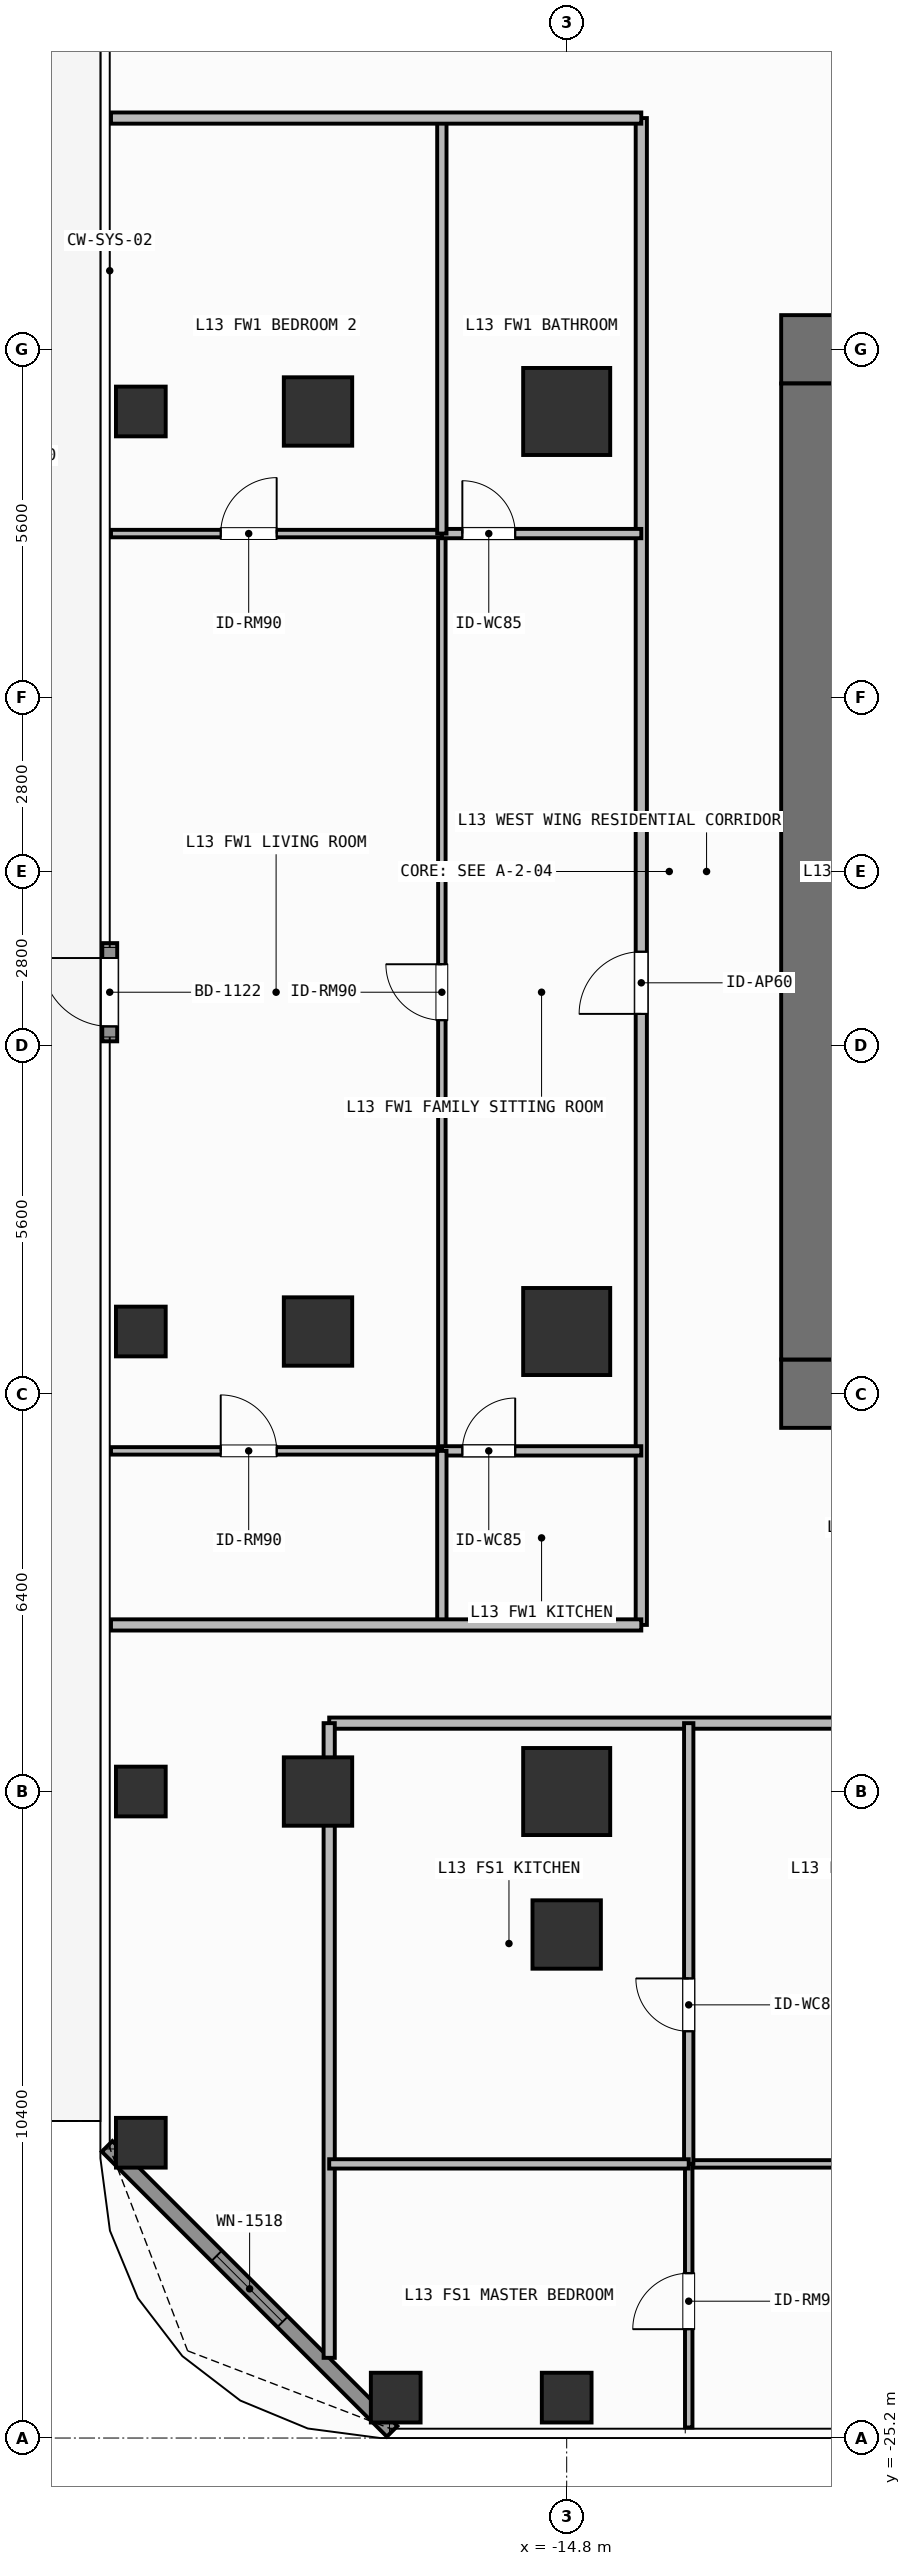
"""IFC4 building model, lengths in metres.
Left out: names, types, materials, properties, quantities, classifications, styles, units other than length and angle.
Written with IfcOpenShell. Run it as: python <this file> out.ifc"""

import sys

from ifc_helpers import new_model, si_unit, direction, frame, frame_2d, origin, origin_2d, place, context, subcontext, project, spatial, rectangle, hollow_rectangle, extrude, element, fill, save


model = new_model("IFC4")
c1 = context("Model", 3, precision=1e-05, world=origin(), true_north=direction((0.0, 1.0)))
c2 = subcontext(c1, "Body", "Model", "MODEL_VIEW")
j1 = project(units=[si_unit("LENGTHUNIT", "METRE"), si_unit("PLANEANGLEUNIT", "RADIAN")], contexts=[c1])
p1 = place(None, origin())
s1 = spatial("IfcSite", under=j1, at=p1, CompositionType="ELEMENT")
p2 = place(p1, origin())
s2 = spatial("IfcBuilding", under=s1, at=p2, CompositionType="ELEMENT")
p3 = place(p2, frame((0.0, 0.0, 50.1)))
s3 = spatial("IfcBuildingStorey", under=s2, at=p3, CompositionType="ELEMENT", Elevation=50.1)
for number, where, z_axis, x_axis in (
    (1, (-11.35, -8.4, 0.0), (0.0, 0.0, 1.0), (1.0, 0.0, 0.0)),
    (2, (-11.35, 8.4, 0.0), (0.0, 0.0, 1.0), (1.0, 0.0, 0.0)),
):
    element("IfcWall", number, at=place(p3, frame(where, z_axis=z_axis, x_axis=x_axis)), inside=s3, PredefinedType="SHEAR", context=c2, shape_type="SweptSolid", body=[
        extrude(rectangle(XDim=1.65, YDim=1.1, at=frame_2d((0.825, 0.0))), origin(), (0.0, 0.0, 1.0), 3.9),
    ])
p4 = place(p3, frame((-10.8, -7.85, 0.0), z_axis=(0.0, 0.0, 1.0), x_axis=(0.0, 1.0, 0.0)))
e3 = element("IfcWall", 3, at=p4, inside=s3, PredefinedType="SHEAR", context=c2, shape_type="SweptSolid", body=[
    extrude(rectangle(XDim=15.7, YDim=1.1, at=frame_2d((7.85, 0.0))), origin(), (0.0, 0.0, 1.0), 3.9),
])
for number, where, z_axis, x_axis in (
    (4, (-14.8, -14.8, 0.0), (0.0, 0.0, 1.0), (1.0, 0.0, 0.0)),
    (5, (-14.8, -7.4, 0.0), (0.0, 0.0, 1.0), (1.0, 0.0, 0.0)),
    (6, (-14.8, 7.4, 0.0), (0.0, 0.0, 1.0), (1.0, 0.0, 0.0)),
):
    element("IfcColumn", number, at=place(p3, frame(where, z_axis=z_axis, x_axis=x_axis)), inside=s3, PredefinedType="COLUMN", context=c2, shape_type="SweptSolid", body=[
        extrude(rectangle(XDim=1.4, YDim=1.4, at=origin_2d()), origin(), (0.0, 0.0, 1.0), 3.9),
    ])
for number, where, z_axis, x_axis in (
    (7, (-18.8, -14.8, 0.0), (0.0, 0.0, 1.0), (1.0, 0.0, 0.0)),
    (8, (-18.8, -7.4, 0.0), (0.0, 0.0, 1.0), (1.0, 0.0, 0.0)),
    (9, (-18.8, 7.4, 0.0), (0.0, 0.0, 1.0), (1.0, 0.0, 0.0)),
    (10, (-14.8, -17.1, 0.0), (0.0, 0.0, 1.0), (1.0, 0.0, 0.0)),
):
    element("IfcColumn", number, at=place(p3, frame(where, z_axis=z_axis, x_axis=x_axis)), inside=s3, PredefinedType="COLUMN", context=c2, shape_type="SweptSolid", body=[
        extrude(rectangle(XDim=1.1, YDim=1.1, at=origin_2d()), origin(), (0.0, 0.0, 1.0), 3.9),
    ])
for number, where, z_axis, x_axis in (
    (11, (-17.55, -24.55, 0.0), (0.0, 0.0, 1.0), (1.0, 0.0, 0.0)),
    (12, (-21.65, -20.45, 0.0), (0.0, 0.0, 1.0), (1.0, 0.0, 0.0)),
    (13, (-14.8, -24.55, 0.0), (0.0, 0.0, 1.0), (1.0, 0.0, 0.0)),
    (14, (-21.65, -14.8, 0.0), (0.0, 0.0, 1.0), (1.0, 0.0, 0.0)),
    (15, (-21.65, -7.4, 0.0), (0.0, 0.0, 1.0), (1.0, 0.0, 0.0)),
    (16, (-21.65, 7.4, 0.0), (0.0, 0.0, 1.0), (1.0, 0.0, 0.0)),
):
    element("IfcColumn", number, at=place(p3, frame(where, z_axis=z_axis, x_axis=x_axis)), inside=s3, PredefinedType="COLUMN", context=c2, shape_type="SweptSolid", body=[
        extrude(hollow_rectangle(XDim=0.8, YDim=0.8, WallThickness=0.036, at=origin_2d()), origin(), (0.0, 0.0, 1.0), 3.9),
    ])
p5 = place(p3, frame((-22.15, -2.732, 0.0), z_axis=(0.0, 0.0, 1.0), x_axis=(0.0, 1.0, 0.0)))
e17 = element("IfcWall", 17, at=p5, inside=s3, PredefinedType="SOLIDWALL", context=c2, shape_type="SweptSolid", body=[
    extrude(rectangle(XDim=1.58, YDim=0.24, at=frame_2d((0.79, 0.0))), origin(), (0.0, 0.0, 1.0), 3.62),
])
p6 = place(p5, frame((0.24, 0.0, 0.0)))
e18 = element("IfcOpeningElement", 18, at=p6, cuts=e17, PredefinedType="OPENING", context=c2, shape_type="SweptSolid", body=[
    extrude(rectangle(XDim=1.1, YDim=2.2, at=frame_2d((0.55, 1.1))), frame((0.0, 0.13, 0.0), z_axis=(0.0, -1.0, 0.0), x_axis=(1.0, 0.0, 0.0)), (0.0, 0.0, 1.0), 0.26),
])
p7 = place(p3, frame((-17.608, -25.092, 0.0), z_axis=(0.0, 0.0, 1.0), x_axis=(-0.707106781187, 0.707106781187, 0.0)))
e19 = element("IfcWall", 19, at=p7, inside=s3, PredefinedType="SOLIDWALL", context=c2, shape_type="SweptSolid", body=[
    extrude(rectangle(XDim=6.484, YDim=0.24, at=frame_2d((3.242, 0.0))), origin(), (0.0, 0.0, 1.0), 3.62),
])
p8 = place(p7, frame((2.492, 0.0, 0.8)))
e20 = element("IfcOpeningElement", 20, at=p8, cuts=e19, PredefinedType="OPENING", context=c2, shape_type="SweptSolid", body=[
    extrude(rectangle(XDim=1.5, YDim=1.85, at=frame_2d((0.75, 0.925))), frame((0.0, 0.13, 0.0), z_axis=(0.0, -1.0, 0.0), x_axis=(1.0, 0.0, 0.0)), (0.0, 0.0, 1.0), 0.26),
])
p9 = place(p3, frame((-18.62, -13.7, 0.0), z_axis=(0.0, 0.0, 1.0), x_axis=(1.0, 0.0, 0.0)))
e21 = element("IfcWall", 21, at=p9, inside=s3, PredefinedType="PARTITIONING", context=c2, shape_type="SweptSolid", body=[
    extrude(rectangle(XDim=24.963, YDim=0.18, at=frame_2d((12.481, 0.0))), origin(), (0.0, 0.0, 1.0), 3.62),
])
p10 = place(p9, frame((11.981, 0.0, 0.0)))
e22 = element("IfcOpeningElement", 22, at=p10, cuts=e21, PredefinedType="OPENING", context=c2, shape_type="SweptSolid", body=[
    extrude(rectangle(XDim=1.0, YDim=2.2, at=frame_2d((0.5, 1.1))), frame((0.0, 0.1, 0.0), z_axis=(0.0, -1.0, 0.0), x_axis=(1.0, 0.0, 0.0)), (0.0, 0.0, 1.0), 0.2),
])
p11 = place(p3, frame((-12.837, -20.79, 0.0), z_axis=(0.0, 0.0, 1.0), x_axis=(1.0, 0.0, 0.0)))
e23 = element("IfcWall", 23, at=p11, inside=s3, PredefinedType="PARTITIONING", context=c2, shape_type="SweptSolid", body=[
    extrude(rectangle(XDim=7.412, YDim=0.12, at=frame_2d((3.706, 0.0))), origin(), (0.0, 0.0, 1.0), 3.62),
])
p12 = place(p11, frame((3.344, 0.0, 0.0)))
e24 = element("IfcOpeningElement", 24, at=p12, cuts=e23, PredefinedType="OPENING", context=c2, shape_type="SweptSolid", body=[
    extrude(rectangle(XDim=0.9, YDim=2.1, at=frame_2d((0.45, 1.05))), frame((0.0, 0.07, 0.0), z_axis=(0.0, -1.0, 0.0), x_axis=(1.0, 0.0, 0.0)), (0.0, 0.0, 1.0), 0.14),
])
p13 = place(p3, frame((-12.837, -20.79, 0.0), z_axis=(0.0, 0.0, 1.0), x_axis=(0.0, 1.0, 0.0)))
e25 = element("IfcWall", 25, at=p13, inside=s3, PredefinedType="PARTITIONING", context=c2, shape_type="SweptSolid", body=[
    extrude(rectangle(XDim=7.09, YDim=0.15, at=frame_2d((3.545, 0.0))), origin(), (0.0, 0.0, 1.0), 3.62),
])
p14 = place(p13, frame((2.133, 0.0, 0.0)))
e26 = element("IfcOpeningElement", 26, at=p14, cuts=e25, PredefinedType="OPENING", context=c2, shape_type="SweptSolid", body=[
    extrude(rectangle(XDim=0.85, YDim=2.1, at=frame_2d((0.425, 1.05))), frame((0.0, 0.085, 0.0), z_axis=(0.0, -1.0, 0.0), x_axis=(1.0, 0.0, 0.0)), (0.0, 0.0, 1.0), 0.17),
])
p15 = place(p3, frame((-12.837, -25.03, 0.0), z_axis=(0.0, 0.0, 1.0), x_axis=(0.0, 1.0, 0.0)))
e27 = element("IfcWall", 27, at=p15, inside=s3, PredefinedType="PARTITIONING", context=c2, shape_type="SweptSolid", body=[
    extrude(rectangle(XDim=4.24, YDim=0.12, at=frame_2d((2.12, 0.0))), origin(), (0.0, 0.0, 1.0), 3.62),
])
p16 = place(p15, frame((1.581, 0.0, 0.0)))
e28 = element("IfcOpeningElement", 28, at=p16, cuts=e27, PredefinedType="OPENING", context=c2, shape_type="SweptSolid", body=[
    extrude(rectangle(XDim=0.9, YDim=2.1, at=frame_2d((0.45, 1.05))), frame((0.0, 0.07, 0.0), z_axis=(0.0, -1.0, 0.0), x_axis=(1.0, 0.0, 0.0)), (0.0, 0.0, 1.0), 0.14),
])
p17 = place(p3, frame((-13.6, -12.12, 0.0), z_axis=(0.0, 0.0, 1.0), x_axis=(0.0, 1.0, 0.0)))
e29 = element("IfcWall", 29, at=p17, inside=s3, PredefinedType="PARTITIONING", context=c2, shape_type="SweptSolid", body=[
    extrude(rectangle(XDim=24.24, YDim=0.18, at=frame_2d((12.12, 0.0))), origin(), (0.0, 0.0, 1.0), 3.62),
])
p18 = place(p17, frame((9.829, 0.0, 0.0)))
e30 = element("IfcOpeningElement", 30, at=p18, cuts=e29, PredefinedType="OPENING", context=c2, shape_type="SweptSolid", body=[
    extrude(rectangle(XDim=1.0, YDim=2.2, at=frame_2d((0.5, 1.1))), frame((0.0, 0.1, 0.0), z_axis=(0.0, -1.0, 0.0), x_axis=(1.0, 0.0, 0.0)), (0.0, 0.0, 1.0), 0.2),
])
p19 = place(p3, frame((-16.808, -9.32, 0.0), z_axis=(0.0, 0.0, 1.0), x_axis=(0.0, 1.0, 0.0)))
e31 = element("IfcWall", 31, at=p19, inside=s3, PredefinedType="PARTITIONING", context=c2, shape_type="SweptSolid", body=[
    extrude(rectangle(XDim=14.756, YDim=0.12, at=frame_2d((7.378, 0.0))), origin(), (0.0, 0.0, 1.0), 3.62),
])
p20 = place(p19, frame((6.928, 0.0, 0.0)))
e32 = element("IfcOpeningElement", 32, at=p20, cuts=e31, PredefinedType="OPENING", context=c2, shape_type="SweptSolid", body=[
    extrude(rectangle(XDim=0.9, YDim=2.1, at=frame_2d((0.45, 1.05))), frame((0.0, 0.07, 0.0), z_axis=(0.0, -1.0, 0.0), x_axis=(1.0, 0.0, 0.0)), (0.0, 0.0, 1.0), 0.14),
])
p21 = place(p3, frame((-16.808, 5.436, 0.0), z_axis=(0.0, 0.0, 1.0), x_axis=(1.0, 0.0, 0.0)))
e33 = element("IfcWall", 33, at=p21, inside=s3, PredefinedType="PARTITIONING", context=c2, shape_type="SweptSolid", body=[
    extrude(rectangle(XDim=3.208, YDim=0.15, at=frame_2d((1.604, 0.0))), origin(), (0.0, 0.0, 1.0), 3.62),
])
p22 = place(p21, frame((0.33, 0.0, 0.0)))
e34 = element("IfcOpeningElement", 34, at=p22, cuts=e33, PredefinedType="OPENING", context=c2, shape_type="SweptSolid", body=[
    extrude(rectangle(XDim=0.85, YDim=2.1, at=frame_2d((0.425, 1.05))), frame((0.0, 0.085, 0.0), z_axis=(0.0, -1.0, 0.0), x_axis=(1.0, 0.0, 0.0)), (0.0, 0.0, 1.0), 0.17),
])
p23 = place(p3, frame((-16.808, -9.32, 0.0), z_axis=(0.0, 0.0, 1.0), x_axis=(1.0, 0.0, 0.0)))
e35 = element("IfcWall", 35, at=p23, inside=s3, PredefinedType="PARTITIONING", context=c2, shape_type="SweptSolid", body=[
    extrude(rectangle(XDim=3.208, YDim=0.15, at=frame_2d((1.604, 0.0))), origin(), (0.0, 0.0, 1.0), 3.62),
])
p24 = place(p23, frame((0.33, 0.0, 0.0)))
e36 = element("IfcOpeningElement", 36, at=p24, cuts=e35, PredefinedType="OPENING", context=c2, shape_type="SweptSolid", body=[
    extrude(rectangle(XDim=0.85, YDim=2.1, at=frame_2d((0.425, 1.05))), frame((0.0, 0.085, 0.0), z_axis=(0.0, -1.0, 0.0), x_axis=(1.0, 0.0, 0.0)), (0.0, 0.0, 1.0), 0.17),
])
p25 = place(p3, frame((-22.13, -9.32, 0.0), z_axis=(0.0, 0.0, 1.0), x_axis=(1.0, 0.0, 0.0)))
e37 = element("IfcWall", 37, at=p25, inside=s3, PredefinedType="PARTITIONING", context=c2, shape_type="SweptSolid", body=[
    extrude(rectangle(XDim=5.322, YDim=0.12, at=frame_2d((2.661, 0.0))), origin(), (0.0, 0.0, 1.0), 3.62),
])
p26 = place(p25, frame((1.765, 0.0, 0.0)))
e38 = element("IfcOpeningElement", 38, at=p26, cuts=e37, PredefinedType="OPENING", context=c2, shape_type="SweptSolid", body=[
    extrude(rectangle(XDim=0.9, YDim=2.1, at=frame_2d((0.45, 1.05))), frame((0.0, 0.07, 0.0), z_axis=(0.0, -1.0, 0.0), x_axis=(1.0, 0.0, 0.0)), (0.0, 0.0, 1.0), 0.14),
])
p27 = place(p3, frame((-22.13, 5.436, 0.0), z_axis=(0.0, 0.0, 1.0), x_axis=(1.0, 0.0, 0.0)))
e39 = element("IfcWall", 39, at=p27, inside=s3, PredefinedType="PARTITIONING", context=c2, shape_type="SweptSolid", body=[
    extrude(rectangle(XDim=5.322, YDim=0.12, at=frame_2d((2.661, 0.0))), origin(), (0.0, 0.0, 1.0), 3.62),
])
p28 = place(p27, frame((1.765, 0.0, 0.0)))
e40 = element("IfcOpeningElement", 40, at=p28, cuts=e39, PredefinedType="OPENING", context=c2, shape_type="SweptSolid", body=[
    extrude(rectangle(XDim=0.9, YDim=2.1, at=frame_2d((0.45, 1.05))), frame((0.0, 0.07, 0.0), z_axis=(0.0, -1.0, 0.0), x_axis=(1.0, 0.0, 0.0)), (0.0, 0.0, 1.0), 0.14),
])
p29 = place(p3, frame((-18.62, -23.91, 0.0), z_axis=(0.0, 0.0, 1.0), x_axis=(0.0, 1.0, 0.0)))
e41 = element("IfcWall", 41, at=p29, inside=s3, PredefinedType="PARTITIONING", context=c2, shape_type="SweptSolid", body=[
    extrude(rectangle(XDim=10.21, YDim=0.18, at=frame_2d((5.105, 0.0))), origin(), (0.0, 0.0, 1.0), 2.71),
])
p30 = place(p3, frame((-18.62, -20.79, 0.0), z_axis=(0.0, 0.0, 1.0), x_axis=(1.0, 0.0, 0.0)))
e42 = element("IfcWall", 42, at=p30, inside=s3, PredefinedType="PARTITIONING", context=c2, shape_type="SweptSolid", body=[
    extrude(rectangle(XDim=5.783, YDim=0.15, at=frame_2d((2.892, 0.0))), origin(), (0.0, 0.0, 1.0), 3.62),
])
p31 = place(p3, frame((-16.808, -12.12, 0.0), z_axis=(0.0, 0.0, 1.0), x_axis=(0.0, 1.0, 0.0)))
e43 = element("IfcWall", 43, at=p31, inside=s3, PredefinedType="PARTITIONING", context=c2, shape_type="SweptSolid", body=[
    extrude(rectangle(XDim=2.8, YDim=0.15, at=frame_2d((1.4, 0.0))), origin(), (0.0, 0.0, 1.0), 3.62),
])
p32 = place(p3, frame((-16.808, 5.436, 0.0), z_axis=(0.0, 0.0, 1.0), x_axis=(0.0, 1.0, 0.0)))
e44 = element("IfcWall", 44, at=p32, inside=s3, PredefinedType="PARTITIONING", context=c2, shape_type="SweptSolid", body=[
    extrude(rectangle(XDim=6.684, YDim=0.15, at=frame_2d((3.342, 0.0))), origin(), (0.0, 0.0, 1.0), 3.62),
])
for number, where, z_axis, x_axis in (
    (45, (-22.13, -12.12, 0.0), (0.0, 0.0, 1.0), (1.0, 0.0, 0.0)),
    (46, (-22.13, 12.12, 0.0), (0.0, 0.0, 1.0), (1.0, 0.0, 0.0)),
):
    element("IfcWall", number, at=place(p3, frame(where, z_axis=z_axis, x_axis=x_axis)), inside=s3, PredefinedType="PARTITIONING", context=c2, shape_type="SweptSolid", body=[
        extrude(rectangle(XDim=8.53, YDim=0.18, at=frame_2d((4.265, 0.0))), origin(), (0.0, 0.0, 1.0), 3.62),
    ])
p33 = place(p6, origin())
e47 = element("IfcDoor", 47, at=p33, inside=s3, OperationType="SINGLE_SWING_RIGHT", PredefinedType="DOOR", context=c2, shape_type="SweptSolid", body=[
    extrude(rectangle(XDim=1.1, YDim=2.2, at=frame_2d((0.55, 1.1))), frame((0.0, 0.025, 0.0), z_axis=(0.0, -1.0, 0.0), x_axis=(1.0, 0.0, 0.0)), (0.0, 0.0, 1.0), 0.05),
])
fill(e18, e47)
p34 = place(p8, origin())
e48 = element("IfcWindow", 48, at=p34, inside=s3, PartitioningType="SINGLE_PANEL", PredefinedType="WINDOW", context=c2, shape_type="SweptSolid", body=[
    extrude(rectangle(XDim=1.5, YDim=1.85, at=frame_2d((0.75, 0.925))), frame((0.0, 0.03, 0.0), z_axis=(0.0, -1.0, 0.0), x_axis=(1.0, 0.0, 0.0)), (0.0, 0.0, 1.0), 0.06),
])
fill(e20, e48)
p35 = place(p14, origin())
e49 = element("IfcDoor", 49, at=p35, inside=s3, OperationType="SINGLE_SWING_RIGHT", PredefinedType="DOOR", context=c2, shape_type="SweptSolid", body=[
    extrude(rectangle(XDim=0.85, YDim=2.1, at=frame_2d((0.425, 1.05))), frame((0.0, 0.025, 0.0), z_axis=(0.0, -1.0, 0.0), x_axis=(1.0, 0.0, 0.0)), (0.0, 0.0, 1.0), 0.05),
])
fill(e26, e49)
p36 = place(p16, origin())
e50 = element("IfcDoor", 50, at=p36, inside=s3, OperationType="SINGLE_SWING_LEFT", PredefinedType="DOOR", context=c2, shape_type="SweptSolid", body=[
    extrude(rectangle(XDim=0.9, YDim=2.1, at=frame_2d((0.45, 1.05))), frame((0.0, 0.025, 0.0), z_axis=(0.0, -1.0, 0.0), x_axis=(1.0, 0.0, 0.0)), (0.0, 0.0, 1.0), 0.05),
])
fill(e28, e50)
p37 = place(p18, origin())
e51 = element("IfcDoor", 51, at=p37, inside=s3, OperationType="SINGLE_SWING_LEFT", PredefinedType="DOOR", context=c2, shape_type="SweptSolid", body=[
    extrude(rectangle(XDim=1.0, YDim=2.2, at=frame_2d((0.5, 1.1))), frame((0.0, 0.025, 0.0), z_axis=(0.0, -1.0, 0.0), x_axis=(1.0, 0.0, 0.0)), (0.0, 0.0, 1.0), 0.05),
])
fill(e30, e51)
p38 = place(p20, origin())
e52 = element("IfcDoor", 52, at=p38, inside=s3, OperationType="SINGLE_SWING_RIGHT", PredefinedType="DOOR", context=c2, shape_type="SweptSolid", body=[
    extrude(rectangle(XDim=0.9, YDim=2.1, at=frame_2d((0.45, 1.05))), frame((0.0, 0.025, 0.0), z_axis=(0.0, -1.0, 0.0), x_axis=(1.0, 0.0, 0.0)), (0.0, 0.0, 1.0), 0.05),
])
fill(e32, e52)
p39 = place(p22, origin())
e53 = element("IfcDoor", 53, at=p39, inside=s3, OperationType="SINGLE_SWING_LEFT", PredefinedType="DOOR", context=c2, shape_type="SweptSolid", body=[
    extrude(rectangle(XDim=0.85, YDim=2.1, at=frame_2d((0.425, 1.05))), frame((0.0, 0.025, 0.0), z_axis=(0.0, -1.0, 0.0), x_axis=(1.0, 0.0, 0.0)), (0.0, 0.0, 1.0), 0.05),
])
fill(e34, e53)
p40 = place(p24, origin())
e54 = element("IfcDoor", 54, at=p40, inside=s3, OperationType="SINGLE_SWING_RIGHT", PredefinedType="DOOR", context=c2, shape_type="SweptSolid", body=[
    extrude(rectangle(XDim=0.85, YDim=2.1, at=frame_2d((0.425, 1.05))), frame((0.0, 0.025, 0.0), z_axis=(0.0, -1.0, 0.0), x_axis=(1.0, 0.0, 0.0)), (0.0, 0.0, 1.0), 0.05),
])
fill(e36, e54)
p41 = place(p26, origin())
e55 = element("IfcDoor", 55, at=p41, inside=s3, OperationType="SINGLE_SWING_LEFT", PredefinedType="DOOR", context=c2, shape_type="SweptSolid", body=[
    extrude(rectangle(XDim=0.9, YDim=2.1, at=frame_2d((0.45, 1.05))), frame((0.0, 0.025, 0.0), z_axis=(0.0, -1.0, 0.0), x_axis=(1.0, 0.0, 0.0)), (0.0, 0.0, 1.0), 0.05),
])
fill(e38, e55)
p42 = place(p28, origin())
e56 = element("IfcDoor", 56, at=p42, inside=s3, OperationType="SINGLE_SWING_RIGHT", PredefinedType="DOOR", context=c2, shape_type="SweptSolid", body=[
    extrude(rectangle(XDim=0.9, YDim=2.1, at=frame_2d((0.45, 1.05))), frame((0.0, 0.025, 0.0), z_axis=(0.0, -1.0, 0.0), x_axis=(1.0, 0.0, 0.0)), (0.0, 0.0, 1.0), 0.05),
])
fill(e40, e56)
save(model, sys.argv[1])
